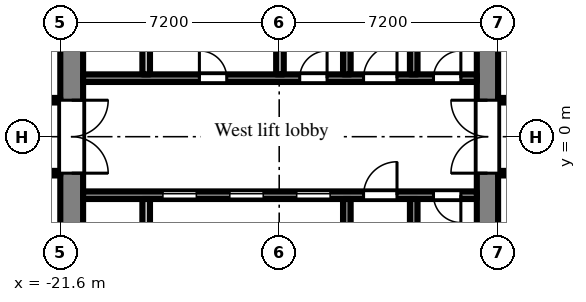
"""IFC4 building model, lengths in metres.
Left out: names, types, materials, properties, quantities, classifications, styles, units other than length and angle.
Written with IfcOpenShell. Run it as: python <this file> out.ifc"""

import sys

from ifc_helpers import new_model, si_unit, direction, frame, frame_2d, origin, place, context, subcontext, project, spatial, rectangle, extrude, element, fill, save


model = new_model("IFC4")
c1 = context("Model", 3, precision=1e-05, world=origin(), true_north=direction((0.0, 1.0)))
c2 = subcontext(c1, "Body", "Model", "MODEL_VIEW")
j1 = project(units=[si_unit("LENGTHUNIT", "METRE"), si_unit("PLANEANGLEUNIT", "RADIAN")], contexts=[c1])
p1 = place(None, origin())
s1 = spatial("IfcSite", under=j1, at=p1, CompositionType="ELEMENT")
p2 = place(p1, origin())
s2 = spatial("IfcBuilding", under=s1, at=p2, CompositionType="ELEMENT")
p3 = place(p2, frame((0.0, 0.0, 62.7)))
s3 = spatial("IfcBuildingStorey", under=s2, at=p3, CompositionType="ELEMENT", Elevation=62.7)
p4 = place(p3, frame((-7.55, -7.2, 0.0), z_axis=(0.0, 0.0, 1.0), x_axis=(0.0, 1.0, 0.0)))
e1 = element("IfcWall", 1, at=p4, inside=s3, PredefinedType="SHEAR", context=c2, shape_type="SweptSolid", body=[
    extrude(rectangle(XDim=14.4, YDim=0.7, at=frame_2d((7.2, 0.0))), origin(), (0.0, 0.0, 1.0), 3.775),
])
p5 = place(p4, frame((6.0, 0.0, 0.0)))
e2 = element("IfcOpeningElement", 2, at=p5, cuts=e1, PredefinedType="OPENING", context=c2, shape_type="SweptSolid", body=[
    extrude(rectangle(XDim=2.4, YDim=2.2, at=frame_2d((1.2, 1.1))), frame((0.0, 0.36, 0.0), z_axis=(0.0, -1.0, 0.0), x_axis=(1.0, 0.0, 0.0)), (0.0, 0.0, 1.0), 0.72),
])
p6 = place(p3, frame((-21.225, -7.2, 0.0), z_axis=(0.0, 0.0, 1.0), x_axis=(0.0, 1.0, 0.0)))
e3 = element("IfcWall", 3, at=p6, inside=s3, PredefinedType="SHEAR", context=c2, shape_type="SweptSolid", body=[
    extrude(rectangle(XDim=14.4, YDim=0.75, at=frame_2d((7.2, 0.0))), origin(), (0.0, 0.0, 1.0), 3.775),
])
p7 = place(p6, frame((6.0, 0.0, 0.0)))
e4 = element("IfcOpeningElement", 4, at=p7, cuts=e3, PredefinedType="OPENING", context=c2, shape_type="SweptSolid", body=[
    extrude(rectangle(XDim=2.4, YDim=2.2, at=frame_2d((1.2, 1.1))), frame((0.0, 0.385, 0.0), z_axis=(0.0, -1.0, 0.0), x_axis=(1.0, 0.0, 0.0)), (0.0, 0.0, 1.0), 0.77),
])
p8 = place(p3, frame((-7.9, 1.925, 0.0), z_axis=(0.0, 0.0, 1.0), x_axis=(-1.0, 0.0, 0.0)))
e5 = element("IfcWall", 5, at=p8, inside=s3, PredefinedType="SHEAR", context=c2, shape_type="SweptSolid", body=[
    extrude(rectangle(XDim=12.95, YDim=0.25, at=frame_2d((6.475, 0.0))), origin(), (0.0, 0.0, 1.0), 3.775),
])
p9 = place(p8, frame((0.525, 0.0, 0.0)))
e6 = element("IfcOpeningElement", 6, at=p9, cuts=e5, PredefinedType="OPENING", context=c2, shape_type="SweptSolid", body=[
    extrude(rectangle(XDim=0.9, YDim=2.1, at=frame_2d((0.45, 1.05))), frame((0.0, 0.135, 0.0), z_axis=(0.0, -1.0, 0.0), x_axis=(1.0, 0.0, 0.0)), (0.0, 0.0, 1.0), 0.27),
])
p10 = place(p8, frame((2.625, 0.0, 0.0)))
e7 = element("IfcOpeningElement", 7, at=p10, cuts=e5, PredefinedType="OPENING", context=c2, shape_type="SweptSolid", body=[
    extrude(rectangle(XDim=1.1, YDim=2.1, at=frame_2d((0.55, 1.05))), frame((0.0, 0.135, 0.0), z_axis=(0.0, -1.0, 0.0), x_axis=(1.0, 0.0, 0.0)), (0.0, 0.0, 1.0), 0.27),
])
p11 = place(p8, frame((4.925, 0.0, 0.0)))
e8 = element("IfcOpeningElement", 8, at=p11, cuts=e5, PredefinedType="OPENING", context=c2, shape_type="SweptSolid", body=[
    extrude(rectangle(XDim=0.9, YDim=2.1, at=frame_2d((0.45, 1.05))), frame((0.0, 0.135, 0.0), z_axis=(0.0, -1.0, 0.0), x_axis=(1.0, 0.0, 0.0)), (0.0, 0.0, 1.0), 0.27),
])
p12 = place(p8, frame((8.225, 0.0, 0.0)))
e9 = element("IfcOpeningElement", 9, at=p12, cuts=e5, PredefinedType="OPENING", context=c2, shape_type="SweptSolid", body=[
    extrude(rectangle(XDim=0.9, YDim=2.1, at=frame_2d((0.45, 1.05))), frame((0.0, 0.135, 0.0), z_axis=(0.0, -1.0, 0.0), x_axis=(1.0, 0.0, 0.0)), (0.0, 0.0, 1.0), 0.27),
])
p13 = place(p3, frame((-9.975, 2.05, 0.0), z_axis=(0.0, 0.0, 1.0), x_axis=(0.0, 1.0, 0.0)))
e10 = element("IfcWall", 10, at=p13, inside=s3, PredefinedType="SHEAR", context=c2, shape_type="SweptSolid", body=[
    extrude(rectangle(XDim=4.65, YDim=0.25, at=frame_2d((2.325, 0.0))), origin(), (0.0, 0.0, 1.0), 3.775),
])
p14 = place(p13, frame((2.95, 0.0, 0.0)))
e11 = element("IfcOpeningElement", 11, at=p14, cuts=e10, PredefinedType="OPENING", context=c2, shape_type="SweptSolid", body=[
    extrude(rectangle(XDim=1.1, YDim=2.1, at=frame_2d((0.55, 1.05))), frame((0.0, 0.135, 0.0), z_axis=(0.0, -1.0, 0.0), x_axis=(1.0, 0.0, 0.0)), (0.0, 0.0, 1.0), 0.27),
])
p15 = place(p3, frame((-12.175, 2.05, 0.0), z_axis=(0.0, 0.0, 1.0), x_axis=(0.0, 1.0, 0.0)))
e12 = element("IfcWall", 12, at=p15, inside=s3, PredefinedType="SHEAR", context=c2, shape_type="SweptSolid", body=[
    extrude(rectangle(XDim=4.65, YDim=0.25, at=frame_2d((2.325, 0.0))), origin(), (0.0, 0.0, 1.0), 3.775),
])
p16 = place(p15, frame((2.95, 0.0, 0.0)))
e13 = element("IfcOpeningElement", 13, at=p16, cuts=e12, PredefinedType="OPENING", context=c2, shape_type="SweptSolid", body=[
    extrude(rectangle(XDim=1.1, YDim=2.1, at=frame_2d((0.55, 1.05))), frame((0.0, 0.135, 0.0), z_axis=(0.0, -1.0, 0.0), x_axis=(1.0, 0.0, 0.0)), (0.0, 0.0, 1.0), 0.27),
])
for number, where, z_axis, x_axis in (
    (14, (-14.375, 2.05, 0.0), (0.0, 0.0, 1.0), (0.0, 1.0, 0.0)),
    (15, (-18.775, 2.05, 0.0), (0.0, 0.0, 1.0), (0.0, 1.0, 0.0)),
):
    element("IfcWall", number, at=place(p3, frame(where, z_axis=z_axis, x_axis=x_axis)), inside=s3, PredefinedType="PARTITIONING", context=c2, shape_type="SweptSolid", body=[
        extrude(rectangle(XDim=2.1, YDim=0.25, at=frame_2d((1.05, 0.0))), origin(), (0.0, 0.0, 1.0), 3.775),
    ])
p17 = place(p3, frame((-7.9, -1.925, 0.0), z_axis=(0.0, 0.0, 1.0), x_axis=(-1.0, 0.0, 0.0)))
e16 = element("IfcWall", 16, at=p17, inside=s3, PredefinedType="SHEAR", context=c2, shape_type="SweptSolid", body=[
    extrude(rectangle(XDim=12.95, YDim=0.25, at=frame_2d((6.475, 0.0))), origin(), (0.0, 0.0, 1.0), 3.775),
])
p18 = place(p17, frame((4.825, 0.0, 0.0)))
e17 = element("IfcOpeningElement", 17, at=p18, cuts=e16, PredefinedType="OPENING", context=c2, shape_type="SweptSolid", body=[
    extrude(rectangle(XDim=1.1, YDim=2.1, at=frame_2d((0.55, 1.05))), frame((0.0, 0.135, 0.0), z_axis=(0.0, -1.0, 0.0), x_axis=(1.0, 0.0, 0.0)), (0.0, 0.0, 1.0), 0.27),
])
p19 = place(p17, frame((7.025, 0.0, 0.0)))
e18 = element("IfcOpeningElement", 18, at=p19, cuts=e16, PredefinedType="OPENING", context=c2, shape_type="SweptSolid", body=[
    extrude(rectangle(XDim=1.1, YDim=2.1, at=frame_2d((0.55, 1.05))), frame((0.0, 0.135, 0.0), z_axis=(0.0, -1.0, 0.0), x_axis=(1.0, 0.0, 0.0)), (0.0, 0.0, 1.0), 0.27),
])
p20 = place(p17, frame((9.225, 0.0, 0.0)))
e19 = element("IfcOpeningElement", 19, at=p20, cuts=e16, PredefinedType="OPENING", context=c2, shape_type="SweptSolid", body=[
    extrude(rectangle(XDim=1.1, YDim=2.1, at=frame_2d((0.55, 1.05))), frame((0.0, 0.135, 0.0), z_axis=(0.0, -1.0, 0.0), x_axis=(1.0, 0.0, 0.0)), (0.0, 0.0, 1.0), 0.27),
])
p21 = place(p17, frame((0.525, 0.0, 0.0)))
e20 = element("IfcOpeningElement", 20, at=p21, cuts=e16, PredefinedType="OPENING", context=c2, shape_type="SweptSolid", body=[
    extrude(rectangle(XDim=0.9, YDim=2.1, at=frame_2d((0.45, 1.05))), frame((0.0, 0.135, 0.0), z_axis=(0.0, -1.0, 0.0), x_axis=(1.0, 0.0, 0.0)), (0.0, 0.0, 1.0), 0.27),
])
p22 = place(p17, frame((2.625, 0.0, 0.0)))
e21 = element("IfcOpeningElement", 21, at=p22, cuts=e16, PredefinedType="OPENING", context=c2, shape_type="SweptSolid", body=[
    extrude(rectangle(XDim=1.1, YDim=2.1, at=frame_2d((0.55, 1.05))), frame((0.0, 0.135, 0.0), z_axis=(0.0, -1.0, 0.0), x_axis=(1.0, 0.0, 0.0)), (0.0, 0.0, 1.0), 0.27),
])
p23 = place(p3, frame((-9.975, -2.05, 0.0), z_axis=(0.0, 0.0, 1.0), x_axis=(0.0, -1.0, 0.0)))
e22 = element("IfcWall", 22, at=p23, inside=s3, PredefinedType="SHEAR", context=c2, shape_type="SweptSolid", body=[
    extrude(rectangle(XDim=4.65, YDim=0.25, at=frame_2d((2.325, 0.0))), origin(), (0.0, 0.0, 1.0), 3.775),
])
p24 = place(p23, frame((2.95, 0.0, 0.0)))
e23 = element("IfcOpeningElement", 23, at=p24, cuts=e22, PredefinedType="OPENING", context=c2, shape_type="SweptSolid", body=[
    extrude(rectangle(XDim=1.1, YDim=2.1, at=frame_2d((0.55, 1.05))), frame((0.0, 0.135, 0.0), z_axis=(0.0, -1.0, 0.0), x_axis=(1.0, 0.0, 0.0)), (0.0, 0.0, 1.0), 0.27),
])
p25 = place(p3, frame((-12.175, -2.05, 0.0), z_axis=(0.0, 0.0, 1.0), x_axis=(0.0, -1.0, 0.0)))
e24 = element("IfcWall", 24, at=p25, inside=s3, PredefinedType="SHEAR", context=c2, shape_type="SweptSolid", body=[
    extrude(rectangle(XDim=4.65, YDim=0.25, at=frame_2d((2.325, 0.0))), origin(), (0.0, 0.0, 1.0), 3.775),
])
p26 = place(p25, frame((2.95, 0.0, 0.0)))
e25 = element("IfcOpeningElement", 25, at=p26, cuts=e24, PredefinedType="OPENING", context=c2, shape_type="SweptSolid", body=[
    extrude(rectangle(XDim=1.1, YDim=2.1, at=frame_2d((0.55, 1.05))), frame((0.0, 0.135, 0.0), z_axis=(0.0, -1.0, 0.0), x_axis=(1.0, 0.0, 0.0)), (0.0, 0.0, 1.0), 0.27),
])
p27 = place(p3, frame((-18.775, -2.05, 0.0), z_axis=(0.0, 0.0, 1.0), x_axis=(0.0, -1.0, 0.0)))
e26 = element("IfcWall", 26, at=p27, inside=s3, PredefinedType="PARTITIONING", context=c2, shape_type="SweptSolid", body=[
    extrude(rectangle(XDim=2.1, YDim=0.25, at=frame_2d((1.05, 0.0))), origin(), (0.0, 0.0, 1.0), 3.775),
])
p28 = place(p3, frame((-36.5, -1.2, 0.0), z_axis=(0.0, 0.0, 1.0), x_axis=(1.0, 0.0, 0.0)))
e27 = element("IfcWall", 27, at=p28, inside=s3, PredefinedType="PARTITIONING", context=c2, shape_type="SweptSolid", body=[
    extrude(rectangle(XDim=14.9, YDim=0.15, at=frame_2d((7.45, 0.0))), origin(), (0.0, 0.0, 1.0), 3.775),
])
p29 = place(p28, frame((12.5, 0.0, 0.0)))
e28 = element("IfcOpeningElement", 28, at=p29, cuts=e27, PredefinedType="OPENING", context=c2, shape_type="SweptSolid", body=[
    extrude(rectangle(XDim=1.2, YDim=2.1, at=frame_2d((0.6, 1.05))), frame((0.0, 0.085, 0.0), z_axis=(0.0, -1.0, 0.0), x_axis=(1.0, 0.0, 0.0)), (0.0, 0.0, 1.0), 0.17),
])
p30 = place(p28, frame((6.8, 0.0, 0.0)))
e29 = element("IfcOpeningElement", 29, at=p30, cuts=e27, PredefinedType="OPENING", context=c2, shape_type="SweptSolid", body=[
    extrude(rectangle(XDim=1.8, YDim=2.1, at=frame_2d((0.9, 1.05))), frame((0.0, 0.085, 0.0), z_axis=(0.0, -1.0, 0.0), x_axis=(1.0, 0.0, 0.0)), (0.0, 0.0, 1.0), 0.17),
])
p31 = place(p28, frame((1.15, 0.0, 0.0)))
e30 = element("IfcOpeningElement", 30, at=p31, cuts=e27, PredefinedType="OPENING", context=c2, shape_type="SweptSolid", body=[
    extrude(rectangle(XDim=1.8, YDim=2.1, at=frame_2d((0.9, 1.05))), frame((0.0, 0.085, 0.0), z_axis=(0.0, -1.0, 0.0), x_axis=(1.0, 0.0, 0.0)), (0.0, 0.0, 1.0), 0.17),
])
p32 = place(p3, frame((-36.5, 1.2, 0.0), z_axis=(0.0, 0.0, 1.0), x_axis=(1.0, 0.0, 0.0)))
e31 = element("IfcWall", 31, at=p32, inside=s3, PredefinedType="PARTITIONING", context=c2, shape_type="SweptSolid", body=[
    extrude(rectangle(XDim=14.9, YDim=0.15, at=frame_2d((7.45, 0.0))), origin(), (0.0, 0.0, 1.0), 3.775),
])
p33 = place(p32, frame((4.75, 0.0, 0.0)))
e32 = element("IfcOpeningElement", 32, at=p33, cuts=e31, PredefinedType="OPENING", context=c2, shape_type="SweptSolid", body=[
    extrude(rectangle(XDim=0.9, YDim=2.1, at=frame_2d((0.45, 1.05))), frame((0.0, 0.085, 0.0), z_axis=(0.0, -1.0, 0.0), x_axis=(1.0, 0.0, 0.0)), (0.0, 0.0, 1.0), 0.17),
])
p34 = place(p32, frame((12.5, 0.0, 0.0)))
e33 = element("IfcOpeningElement", 33, at=p34, cuts=e31, PredefinedType="OPENING", context=c2, shape_type="SweptSolid", body=[
    extrude(rectangle(XDim=1.2, YDim=2.1, at=frame_2d((0.6, 1.05))), frame((0.0, 0.085, 0.0), z_axis=(0.0, -1.0, 0.0), x_axis=(1.0, 0.0, 0.0)), (0.0, 0.0, 1.0), 0.17),
])
p35 = place(p32, frame((1.15, 0.0, 0.0)))
e34 = element("IfcOpeningElement", 34, at=p35, cuts=e31, PredefinedType="OPENING", context=c2, shape_type="SweptSolid", body=[
    extrude(rectangle(XDim=1.8, YDim=2.1, at=frame_2d((0.9, 1.05))), frame((0.0, 0.085, 0.0), z_axis=(0.0, -1.0, 0.0), x_axis=(1.0, 0.0, 0.0)), (0.0, 0.0, 1.0), 0.17),
])
p36 = place(p3, frame((-7.2, -1.2, 0.0), z_axis=(0.0, 0.0, 1.0), x_axis=(1.0, 0.0, 0.0)))
e35 = element("IfcWall", 35, at=p36, inside=s3, PredefinedType="PARTITIONING", context=c2, shape_type="SweptSolid", body=[
    extrude(rectangle(XDim=5.925, YDim=0.15, at=frame_2d((2.962, 0.0))), origin(), (0.0, 0.0, 1.0), 3.775),
])
p37 = place(p36, frame((0.85, 0.0, 0.0)))
e36 = element("IfcOpeningElement", 36, at=p37, cuts=e35, PredefinedType="OPENING", context=c2, shape_type="SweptSolid", body=[
    extrude(rectangle(XDim=1.2, YDim=2.1, at=frame_2d((0.6, 1.05))), frame((0.0, 0.085, 0.0), z_axis=(0.0, -1.0, 0.0), x_axis=(1.0, 0.0, 0.0)), (0.0, 0.0, 1.0), 0.17),
])
p38 = place(p3, frame((-7.2, 1.2, 0.0), z_axis=(0.0, 0.0, 1.0), x_axis=(1.0, 0.0, 0.0)))
e37 = element("IfcWall", 37, at=p38, inside=s3, PredefinedType="PARTITIONING", context=c2, shape_type="SweptSolid", body=[
    extrude(rectangle(XDim=5.925, YDim=0.15, at=frame_2d((2.962, 0.0))), origin(), (0.0, 0.0, 1.0), 3.775),
])
p39 = place(p38, frame((0.65, 0.0, 0.0)))
e38 = element("IfcOpeningElement", 38, at=p39, cuts=e37, PredefinedType="OPENING", context=c2, shape_type="SweptSolid", body=[
    extrude(rectangle(XDim=1.2, YDim=2.1, at=frame_2d((0.6, 1.05))), frame((0.0, 0.085, 0.0), z_axis=(0.0, -1.0, 0.0), x_axis=(1.0, 0.0, 0.0)), (0.0, 0.0, 1.0), 0.17),
])
p40 = place(p38, frame((4.925, 0.0, 0.0)))
e39 = element("IfcOpeningElement", 39, at=p40, cuts=e37, PredefinedType="OPENING", context=c2, shape_type="SweptSolid", body=[
    extrude(rectangle(XDim=0.9, YDim=2.1, at=frame_2d((0.45, 1.05))), frame((0.0, 0.085, 0.0), z_axis=(0.0, -1.0, 0.0), x_axis=(1.0, 0.0, 0.0)), (0.0, 0.0, 1.0), 0.17),
])
p41 = place(p18, origin())
e40 = element("IfcDoor", 40, at=p41, inside=s3, OperationType="SLIDING_TO_LEFT", PredefinedType="DOOR", context=c2, shape_type="SweptSolid", body=[
    extrude(rectangle(XDim=1.1, YDim=2.1, at=frame_2d((0.55, 1.05))), frame((0.0, 0.025, 0.0), z_axis=(0.0, -1.0, 0.0), x_axis=(1.0, 0.0, 0.0)), (0.0, 0.0, 1.0), 0.05),
])
fill(e17, e40)
p42 = place(p19, origin())
e41 = element("IfcDoor", 41, at=p42, inside=s3, OperationType="SLIDING_TO_LEFT", PredefinedType="DOOR", context=c2, shape_type="SweptSolid", body=[
    extrude(rectangle(XDim=1.1, YDim=2.1, at=frame_2d((0.55, 1.05))), frame((0.0, 0.025, 0.0), z_axis=(0.0, -1.0, 0.0), x_axis=(1.0, 0.0, 0.0)), (0.0, 0.0, 1.0), 0.05),
])
fill(e18, e41)
p43 = place(p20, origin())
e42 = element("IfcDoor", 42, at=p43, inside=s3, OperationType="SLIDING_TO_LEFT", PredefinedType="DOOR", context=c2, shape_type="SweptSolid", body=[
    extrude(rectangle(XDim=1.1, YDim=2.1, at=frame_2d((0.55, 1.05))), frame((0.0, 0.025, 0.0), z_axis=(0.0, -1.0, 0.0), x_axis=(1.0, 0.0, 0.0)), (0.0, 0.0, 1.0), 0.05),
])
fill(e19, e42)
p44 = place(p9, frame((0.9, 0.0, 0.0), z_axis=(0.0, 0.0, 1.0), x_axis=(-1.0, 0.0, 0.0)))
e43 = element("IfcDoor", 43, at=p44, inside=s3, OperationType="SINGLE_SWING_RIGHT", PredefinedType="DOOR", context=c2, shape_type="SweptSolid", body=[
    extrude(rectangle(XDim=0.9, YDim=2.1, at=frame_2d((0.45, 1.05))), frame((0.0, 0.025, 0.0), z_axis=(0.0, -1.0, 0.0), x_axis=(1.0, 0.0, 0.0)), (0.0, 0.0, 1.0), 0.05),
])
fill(e6, e43)
p45 = place(p21, origin())
e44 = element("IfcDoor", 44, at=p45, inside=s3, OperationType="SINGLE_SWING_LEFT", PredefinedType="DOOR", context=c2, shape_type="SweptSolid", body=[
    extrude(rectangle(XDim=0.9, YDim=2.1, at=frame_2d((0.45, 1.05))), frame((0.0, 0.025, 0.0), z_axis=(0.0, -1.0, 0.0), x_axis=(1.0, 0.0, 0.0)), (0.0, 0.0, 1.0), 0.05),
])
fill(e20, e44)
p46 = place(p10, frame((1.1, 0.0, 0.0), z_axis=(0.0, 0.0, 1.0), x_axis=(-1.0, 0.0, 0.0)))
e45 = element("IfcDoor", 45, at=p46, inside=s3, OperationType="SINGLE_SWING_RIGHT", PredefinedType="DOOR", context=c2, shape_type="SweptSolid", body=[
    extrude(rectangle(XDim=1.1, YDim=2.1, at=frame_2d((0.55, 1.05))), frame((0.0, 0.025, 0.0), z_axis=(0.0, -1.0, 0.0), x_axis=(1.0, 0.0, 0.0)), (0.0, 0.0, 1.0), 0.05),
])
fill(e7, e45)
p47 = place(p22, frame((1.1, 0.0, 0.0), z_axis=(0.0, 0.0, 1.0), x_axis=(-1.0, 0.0, 0.0)))
e46 = element("IfcDoor", 46, at=p47, inside=s3, OperationType="SINGLE_SWING_RIGHT", PredefinedType="DOOR", context=c2, shape_type="SweptSolid", body=[
    extrude(rectangle(XDim=1.1, YDim=2.1, at=frame_2d((0.55, 1.05))), frame((0.0, 0.025, 0.0), z_axis=(0.0, -1.0, 0.0), x_axis=(1.0, 0.0, 0.0)), (0.0, 0.0, 1.0), 0.05),
])
fill(e21, e46)
p48 = place(p5, origin())
e47 = element("IfcDoor", 47, at=p48, inside=s3, OperationType="DOUBLE_DOOR_DOUBLE_SWING", PredefinedType="DOOR", context=c2, shape_type="SweptSolid", body=[
    extrude(rectangle(XDim=2.4, YDim=2.2, at=frame_2d((1.2, 1.1))), frame((0.0, 0.025, 0.0), z_axis=(0.0, -1.0, 0.0), x_axis=(1.0, 0.0, 0.0)), (0.0, 0.0, 1.0), 0.05),
])
fill(e2, e47)
p49 = place(p7, frame((2.4, 0.0, 0.0), z_axis=(0.0, 0.0, 1.0), x_axis=(-1.0, 0.0, 0.0)))
e48 = element("IfcDoor", 48, at=p49, inside=s3, OperationType="DOUBLE_DOOR_DOUBLE_SWING", PredefinedType="DOOR", context=c2, shape_type="SweptSolid", body=[
    extrude(rectangle(XDim=2.4, YDim=2.2, at=frame_2d((1.2, 1.1))), frame((0.0, 0.025, 0.0), z_axis=(0.0, -1.0, 0.0), x_axis=(1.0, 0.0, 0.0)), (0.0, 0.0, 1.0), 0.05),
])
fill(e4, e48)
p50 = place(p11, frame((0.9, 0.0, 0.0), z_axis=(0.0, 0.0, 1.0), x_axis=(-1.0, 0.0, 0.0)))
e49 = element("IfcDoor", 49, at=p50, inside=s3, OperationType="SINGLE_SWING_RIGHT", PredefinedType="DOOR", context=c2, shape_type="SweptSolid", body=[
    extrude(rectangle(XDim=0.9, YDim=2.1, at=frame_2d((0.45, 1.05))), frame((0.0, 0.025, 0.0), z_axis=(0.0, -1.0, 0.0), x_axis=(1.0, 0.0, 0.0)), (0.0, 0.0, 1.0), 0.05),
])
fill(e8, e49)
p51 = place(p12, frame((0.9, 0.0, 0.0), z_axis=(0.0, 0.0, 1.0), x_axis=(-1.0, 0.0, 0.0)))
e50 = element("IfcDoor", 50, at=p51, inside=s3, OperationType="SINGLE_SWING_LEFT", PredefinedType="DOOR", context=c2, shape_type="SweptSolid", body=[
    extrude(rectangle(XDim=0.9, YDim=2.1, at=frame_2d((0.45, 1.05))), frame((0.0, 0.025, 0.0), z_axis=(0.0, -1.0, 0.0), x_axis=(1.0, 0.0, 0.0)), (0.0, 0.0, 1.0), 0.05),
])
fill(e9, e50)
save(model, sys.argv[1])
